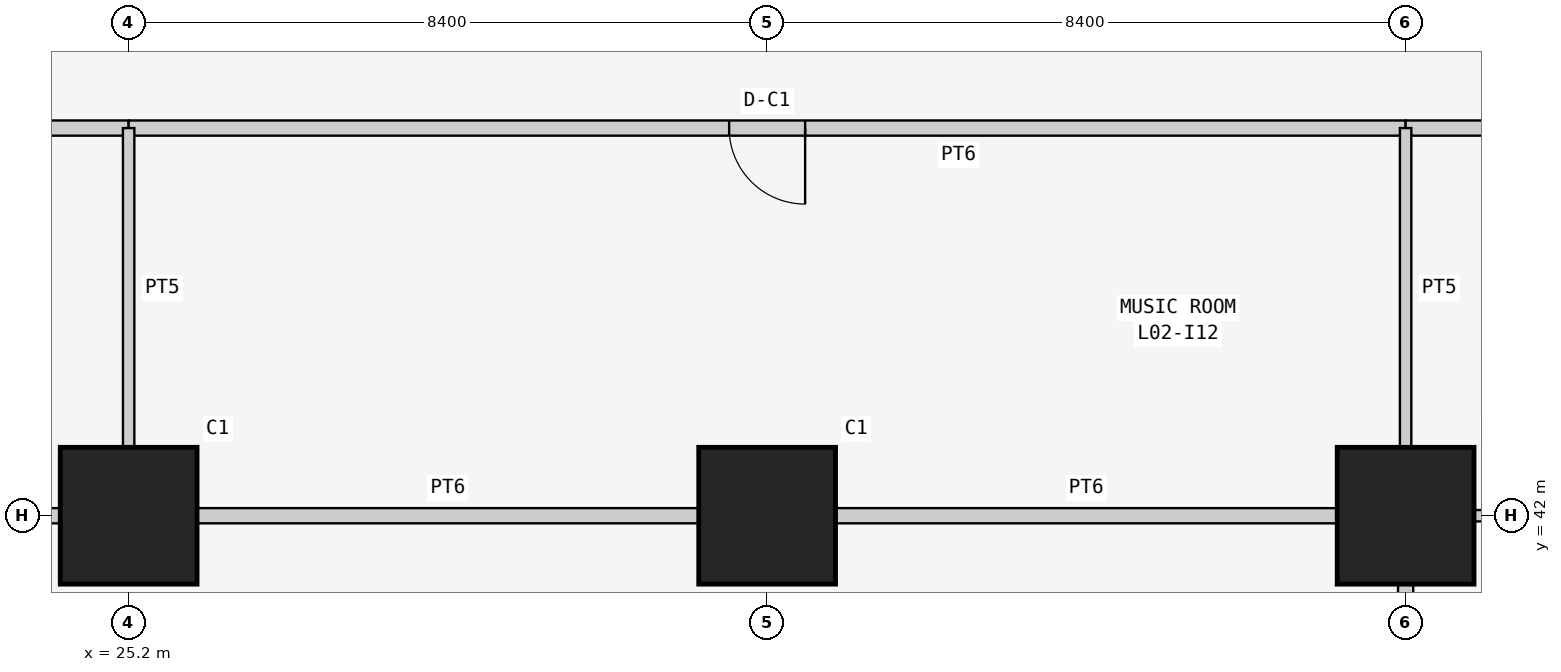
"""IFC4 building model, lengths in metres.
Left out: names, types, materials, properties, quantities, classifications, styles, units other than length and angle.
Written with IfcOpenShell. Run it as: python <this file> out.ifc"""

import sys

from ifc_helpers import new_model, si_unit, direction, frame, frame_2d, origin, origin_2d, place, context, subcontext, project, spatial, rectangle, extrude, element, fill, save


model = new_model("IFC4")
c1 = context("Model", 3, precision=1e-05, world=origin(), true_north=direction((0.0, 1.0)))
c2 = subcontext(c1, "Body", "Model", "MODEL_VIEW")
j1 = project(units=[si_unit("LENGTHUNIT", "METRE"), si_unit("PLANEANGLEUNIT", "RADIAN")], contexts=[c1])
p1 = place(None, origin())
s1 = spatial("IfcSite", under=j1, at=p1, CompositionType="ELEMENT")
p2 = place(p1, origin())
s2 = spatial("IfcBuilding", under=s1, at=p2, CompositionType="ELEMENT")
p3 = place(p2, frame((0.0, 0.0, 10.5)))
s3 = spatial("IfcBuildingStorey", under=s2, at=p3, CompositionType="ELEMENT", Elevation=10.5)
for number, where, z_axis, x_axis in (
    (1, (25.2, 42.0, 0.0), (0.0, 0.0, 1.0), (1.0, 0.0, 0.0)),
    (2, (33.6, 42.0, 0.0), (0.0, 0.0, 1.0), (1.0, 0.0, 0.0)),
    (3, (42.0, 42.0, 0.0), (0.0, 0.0, 1.0), (1.0, 0.0, 0.0)),
):
    element("IfcColumn", number, at=place(p3, frame(where, z_axis=z_axis, x_axis=x_axis)), inside=s3, PredefinedType="COLUMN", context=c2, shape_type="SweptSolid", body=[
        extrude(rectangle(XDim=1.8, YDim=1.8, at=origin_2d()), origin(), (0.0, 0.0, 1.0), 4.5),
    ])
p4 = place(p3, frame((25.2, 47.1, 0.0), z_axis=(0.0, 0.0, 1.0), x_axis=(-1.0, 0.0, 0.0)))
e4 = element("IfcWall", 4, at=p4, inside=s3, PredefinedType="PARTITIONING", context=c2, shape_type="SweptSolid", body=[
    extrude(rectangle(XDim=13.5, YDim=0.2, at=frame_2d((6.75, 0.0))), origin(), (0.0, 0.0, 1.0), 4.3),
])
p5 = place(p4, frame((6.25, 0.0, 0.0)))
e5 = element("IfcOpeningElement", 5, at=p5, cuts=e4, PredefinedType="OPENING", context=c2, shape_type="SweptSolid", body=[
    extrude(rectangle(XDim=1.0, YDim=2.1, at=frame_2d((0.5, 1.05))), frame((0.0, 0.11, 0.0), z_axis=(0.0, -1.0, 0.0), x_axis=(1.0, 0.0, 0.0)), (0.0, 0.0, 1.0), 0.22),
])
p6 = place(p3, frame((42.0, 47.1, 0.0), z_axis=(0.0, 0.0, 1.0), x_axis=(-1.0, 0.0, 0.0)))
e6 = element("IfcWall", 6, at=p6, inside=s3, PredefinedType="PARTITIONING", context=c2, shape_type="SweptSolid", body=[
    extrude(rectangle(XDim=16.8, YDim=0.2, at=frame_2d((8.4, 0.0))), origin(), (0.0, 0.0, 1.0), 4.3),
])
p7 = place(p6, frame((7.9, 0.0, 0.0)))
e7 = element("IfcOpeningElement", 7, at=p7, cuts=e6, PredefinedType="OPENING", context=c2, shape_type="SweptSolid", body=[
    extrude(rectangle(XDim=1.0, YDim=2.1, at=frame_2d((0.5, 1.05))), frame((0.0, 0.11, 0.0), z_axis=(0.0, -1.0, 0.0), x_axis=(1.0, 0.0, 0.0)), (0.0, 0.0, 1.0), 0.22),
])
p8 = place(p3, frame((47.1, 47.1, 0.0), z_axis=(0.0, 0.0, 1.0), x_axis=(-1.0, 0.0, 0.0)))
e8 = element("IfcWall", 8, at=p8, inside=s3, PredefinedType="PARTITIONING", context=c2, shape_type="SweptSolid", body=[
    extrude(rectangle(XDim=5.1, YDim=0.2, at=frame_2d((2.55, 0.0))), origin(), (0.0, 0.0, 1.0), 4.3),
])
p9 = place(p3, frame((42.0, 41.1, 0.0), z_axis=(0.0, 0.0, 1.0), x_axis=(0.0, -1.0, 0.0)))
e9 = element("IfcWall", 9, at=p9, inside=s3, PredefinedType="PARTITIONING", context=c2, shape_type="SweptSolid", body=[
    extrude(rectangle(XDim=6.6, YDim=0.2, at=frame_2d((3.3, 0.0))), origin(), (0.0, 0.0, 1.0), 3.543),
])
p10 = place(p3, frame((20.5, 42.0, 0.0), z_axis=(0.0, 0.0, 1.0), x_axis=(1.0, 0.0, 0.0)))
e10 = element("IfcWall", 10, at=p10, inside=s3, PredefinedType="PARTITIONING", context=c2, shape_type="SweptSolid", body=[
    extrude(rectangle(XDim=3.8, YDim=0.2, at=frame_2d((1.9, 0.0))), origin(), (0.0, 0.0, 1.0), 3.543),
])
p11 = place(p3, frame((26.1, 42.0, 0.0), z_axis=(0.0, 0.0, 1.0), x_axis=(1.0, 0.0, 0.0)))
e11 = element("IfcWall", 11, at=p11, inside=s3, PredefinedType="PARTITIONING", context=c2, shape_type="SweptSolid", body=[
    extrude(rectangle(XDim=6.6, YDim=0.2, at=frame_2d((3.3, 0.0))), origin(), (0.0, 0.0, 1.0), 3.543),
])
p12 = place(p3, frame((34.5, 42.0, 0.0), z_axis=(0.0, 0.0, 1.0), x_axis=(1.0, 0.0, 0.0)))
e12 = element("IfcWall", 12, at=p12, inside=s3, PredefinedType="PARTITIONING", context=c2, shape_type="SweptSolid", body=[
    extrude(rectangle(XDim=6.6, YDim=0.2, at=frame_2d((3.3, 0.0))), origin(), (0.0, 0.0, 1.0), 3.543),
])
for number, where, z_axis, x_axis in (
    (13, (42.9, 42.0, 0.0), (0.0, 0.0, 1.0), (1.0, 0.0, 0.0)),
    (14, (25.2, 47.1, 0.0), (0.0, 0.0, 1.0), (0.0, -1.0, 0.0)),
    (15, (42.0, 47.1, 0.0), (0.0, 0.0, 1.0), (0.0, -1.0, 0.0)),
):
    element("IfcWall", number, at=place(p3, frame(where, z_axis=z_axis, x_axis=x_axis)), inside=s3, PredefinedType="PARTITIONING", context=c2, shape_type="SweptSolid", body=[
        extrude(rectangle(XDim=4.2, YDim=0.15, at=frame_2d((2.1, 0.0))), origin(), (0.0, 0.0, 1.0), 3.543),
    ])
p13 = place(p7, origin())
e16 = element("IfcDoor", 16, at=p13, inside=s3, OperationType="SINGLE_SWING_LEFT", PredefinedType="DOOR", context=c2, shape_type="SweptSolid", body=[
    extrude(rectangle(XDim=1.0, YDim=2.1, at=frame_2d((0.5, 1.05))), frame((0.0, 0.025, 0.0), z_axis=(0.0, -1.0, 0.0), x_axis=(1.0, 0.0, 0.0)), (0.0, 0.0, 1.0), 0.05),
])
fill(e7, e16)
save(model, sys.argv[1])
